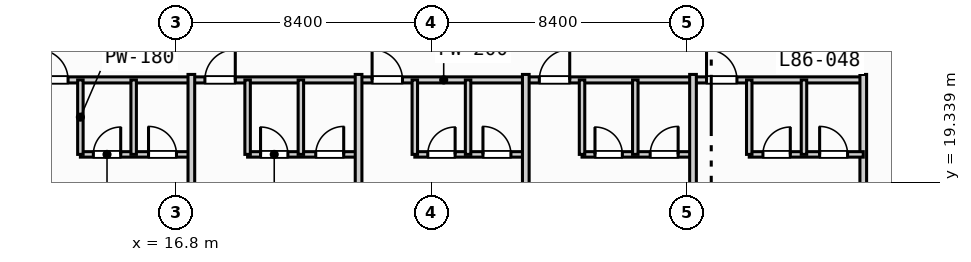
"""IFC4 building model, lengths in metres.
Left out: names, types, materials, properties, quantities, classifications, styles, units other than length and angle.
Written with IfcOpenShell. Run it as: python <this file> out.ifc"""

import sys

from ifc_helpers import new_model, si_unit, direction, frame, frame_2d, origin, place, context, subcontext, project, spatial, rectangle, extrude, element, fill, save


model = new_model("IFC4")
c1 = context("Model", 3, precision=1e-05, world=origin(), true_north=direction((0.0, 1.0)))
c2 = subcontext(c1, "Body", "Model", "MODEL_VIEW")
j1 = project(units=[si_unit("LENGTHUNIT", "METRE"), si_unit("PLANEANGLEUNIT", "RADIAN")], contexts=[c1])
p1 = place(None, origin())
s1 = spatial("IfcSite", under=j1, at=p1, CompositionType="ELEMENT")
p2 = place(p1, origin())
s2 = spatial("IfcBuilding", under=s1, at=p2, CompositionType="ELEMENT")
p3 = place(p2, frame((0.0, 0.0, 347.6)))
s3 = spatial("IfcBuildingStorey", under=s2, at=p3, CompositionType="ELEMENT", Elevation=347.6)
p4 = place(p3, frame((11.8, 22.7, 0.0), z_axis=(0.0, 0.0, 1.0), x_axis=(1.0, 0.0, 0.0)))
e1 = element("IfcWall", 1, at=p4, inside=s3, PredefinedType="PARTITIONING", context=c2, shape_type="SweptSolid", body=[
    extrude(rectangle(XDim=27.6, YDim=0.2, at=frame_2d((13.8, 0.0))), origin(), (0.0, 0.0, 1.0), 3.67),
])
p5 = place(p4, frame((0.445, 0.0, 0.0)))
e2 = element("IfcOpeningElement", 2, at=p5, cuts=e1, PredefinedType="OPENING", context=c2, shape_type="SweptSolid", body=[
    extrude(rectangle(XDim=1.0, YDim=2.15, at=frame_2d((0.5, 1.075))), frame((0.0, 0.11, 0.0), z_axis=(0.0, -1.0, 0.0), x_axis=(1.0, 0.0, 0.0)), (0.0, 0.0, 1.0), 0.22),
])
p6 = place(p4, frame((5.945, 0.0, 0.0)))
e3 = element("IfcOpeningElement", 3, at=p6, cuts=e1, PredefinedType="OPENING", context=c2, shape_type="SweptSolid", body=[
    extrude(rectangle(XDim=1.0, YDim=2.15, at=frame_2d((0.5, 1.075))), frame((0.0, 0.11, 0.0), z_axis=(0.0, -1.0, 0.0), x_axis=(1.0, 0.0, 0.0)), (0.0, 0.0, 1.0), 0.22),
])
p7 = place(p4, frame((11.445, 0.0, 0.0)))
e4 = element("IfcOpeningElement", 4, at=p7, cuts=e1, PredefinedType="OPENING", context=c2, shape_type="SweptSolid", body=[
    extrude(rectangle(XDim=1.0, YDim=2.15, at=frame_2d((0.5, 1.075))), frame((0.0, 0.11, 0.0), z_axis=(0.0, -1.0, 0.0), x_axis=(1.0, 0.0, 0.0)), (0.0, 0.0, 1.0), 0.22),
])
p8 = place(p4, frame((16.945, 0.0, 0.0)))
e5 = element("IfcOpeningElement", 5, at=p8, cuts=e1, PredefinedType="OPENING", context=c2, shape_type="SweptSolid", body=[
    extrude(rectangle(XDim=1.0, YDim=2.15, at=frame_2d((0.5, 1.075))), frame((0.0, 0.11, 0.0), z_axis=(0.0, -1.0, 0.0), x_axis=(1.0, 0.0, 0.0)), (0.0, 0.0, 1.0), 0.22),
])
p9 = place(p4, frame((22.445, 0.0, 0.0)))
e6 = element("IfcOpeningElement", 6, at=p9, cuts=e1, PredefinedType="OPENING", context=c2, shape_type="SweptSolid", body=[
    extrude(rectangle(XDim=1.0, YDim=2.15, at=frame_2d((0.5, 1.075))), frame((0.0, 0.11, 0.0), z_axis=(0.0, -1.0, 0.0), x_axis=(1.0, 0.0, 0.0)), (0.0, 0.0, 1.0), 0.22),
])
p10 = place(p3, frame((13.65, 20.25, 0.0), z_axis=(0.0, 0.0, 1.0), x_axis=(1.0, 0.0, 0.0)))
e7 = element("IfcWall", 7, at=p10, inside=s3, PredefinedType="PLUMBINGWALL", context=c2, shape_type="SweptSolid", body=[
    extrude(rectangle(XDim=3.65, YDim=0.18, at=frame_2d((1.825, 0.0))), origin(), (0.0, 0.0, 1.0), 3.67),
])
p11 = place(p10, frame((0.426, 0.0, 0.0)))
e8 = element("IfcOpeningElement", 8, at=p11, cuts=e7, PredefinedType="OPENING", context=c2, shape_type="SweptSolid", body=[
    extrude(rectangle(XDim=0.9, YDim=2.1, at=frame_2d((0.45, 1.05))), frame((0.0, 0.1, 0.0), z_axis=(0.0, -1.0, 0.0), x_axis=(1.0, 0.0, 0.0)), (0.0, 0.0, 1.0), 0.2),
])
p12 = place(p10, frame((2.241, 0.0, 0.0)))
e9 = element("IfcOpeningElement", 9, at=p12, cuts=e7, PredefinedType="OPENING", context=c2, shape_type="SweptSolid", body=[
    extrude(rectangle(XDim=0.92, YDim=2.1, at=frame_2d((0.46, 1.05))), frame((0.0, 0.1, 0.0), z_axis=(0.0, -1.0, 0.0), x_axis=(1.0, 0.0, 0.0)), (0.0, 0.0, 1.0), 0.2),
])
for number, where, z_axis, x_axis in (
    (10, (13.65, 20.25, 0.0), (0.0, 0.0, 1.0), (0.0, 1.0, 0.0)),
    (11, (15.402, 20.25, 0.0), (0.0, 0.0, 1.0), (0.0, 1.0, 0.0)),
):
    element("IfcWall", number, at=place(p3, frame(where, z_axis=z_axis, x_axis=x_axis)), inside=s3, PredefinedType="PLUMBINGWALL", context=c2, shape_type="SweptSolid", body=[
        extrude(rectangle(XDim=2.45, YDim=0.18, at=frame_2d((1.225, 0.0))), origin(), (0.0, 0.0, 1.0), 3.67),
    ])
p13 = place(p3, frame((17.3, 8.6, 0.0), z_axis=(0.0, 0.0, 1.0), x_axis=(0.0, 1.0, 0.0)))
e12 = element("IfcWall", 12, at=p13, inside=s3, PredefinedType="PARTITIONING", context=c2, shape_type="SweptSolid", body=[
    extrude(rectangle(XDim=14.28, YDim=0.22, at=frame_2d((7.14, 0.0))), origin(), (0.0, 0.0, 1.0), 3.67),
])
p14 = place(p3, frame((19.15, 20.25, 0.0), z_axis=(0.0, 0.0, 1.0), x_axis=(1.0, 0.0, 0.0)))
e13 = element("IfcWall", 13, at=p14, inside=s3, PredefinedType="PLUMBINGWALL", context=c2, shape_type="SweptSolid", body=[
    extrude(rectangle(XDim=3.65, YDim=0.18, at=frame_2d((1.825, 0.0))), origin(), (0.0, 0.0, 1.0), 3.67),
])
p15 = place(p14, frame((0.426, 0.0, 0.0)))
e14 = element("IfcOpeningElement", 14, at=p15, cuts=e13, PredefinedType="OPENING", context=c2, shape_type="SweptSolid", body=[
    extrude(rectangle(XDim=0.9, YDim=2.1, at=frame_2d((0.45, 1.05))), frame((0.0, 0.1, 0.0), z_axis=(0.0, -1.0, 0.0), x_axis=(1.0, 0.0, 0.0)), (0.0, 0.0, 1.0), 0.2),
])
p16 = place(p14, frame((2.241, 0.0, 0.0)))
e15 = element("IfcOpeningElement", 15, at=p16, cuts=e13, PredefinedType="OPENING", context=c2, shape_type="SweptSolid", body=[
    extrude(rectangle(XDim=0.92, YDim=2.1, at=frame_2d((0.46, 1.05))), frame((0.0, 0.1, 0.0), z_axis=(0.0, -1.0, 0.0), x_axis=(1.0, 0.0, 0.0)), (0.0, 0.0, 1.0), 0.2),
])
for number, where, z_axis, x_axis in (
    (16, (19.15, 20.25, 0.0), (0.0, 0.0, 1.0), (0.0, 1.0, 0.0)),
    (17, (20.902, 20.25, 0.0), (0.0, 0.0, 1.0), (0.0, 1.0, 0.0)),
):
    element("IfcWall", number, at=place(p3, frame(where, z_axis=z_axis, x_axis=x_axis)), inside=s3, PredefinedType="PLUMBINGWALL", context=c2, shape_type="SweptSolid", body=[
        extrude(rectangle(XDim=2.45, YDim=0.18, at=frame_2d((1.225, 0.0))), origin(), (0.0, 0.0, 1.0), 3.67),
    ])
p17 = place(p3, frame((22.8, 8.6, 0.0), z_axis=(0.0, 0.0, 1.0), x_axis=(0.0, 1.0, 0.0)))
e18 = element("IfcWall", 18, at=p17, inside=s3, PredefinedType="PARTITIONING", context=c2, shape_type="SweptSolid", body=[
    extrude(rectangle(XDim=14.28, YDim=0.22, at=frame_2d((7.14, 0.0))), origin(), (0.0, 0.0, 1.0), 3.67),
])
p18 = place(p3, frame((24.65, 20.25, 0.0), z_axis=(0.0, 0.0, 1.0), x_axis=(1.0, 0.0, 0.0)))
e19 = element("IfcWall", 19, at=p18, inside=s3, PredefinedType="PLUMBINGWALL", context=c2, shape_type="SweptSolid", body=[
    extrude(rectangle(XDim=3.65, YDim=0.18, at=frame_2d((1.825, 0.0))), origin(), (0.0, 0.0, 1.0), 3.67),
])
p19 = place(p18, frame((0.426, 0.0, 0.0)))
e20 = element("IfcOpeningElement", 20, at=p19, cuts=e19, PredefinedType="OPENING", context=c2, shape_type="SweptSolid", body=[
    extrude(rectangle(XDim=0.9, YDim=2.1, at=frame_2d((0.45, 1.05))), frame((0.0, 0.1, 0.0), z_axis=(0.0, -1.0, 0.0), x_axis=(1.0, 0.0, 0.0)), (0.0, 0.0, 1.0), 0.2),
])
p20 = place(p18, frame((2.241, 0.0, 0.0)))
e21 = element("IfcOpeningElement", 21, at=p20, cuts=e19, PredefinedType="OPENING", context=c2, shape_type="SweptSolid", body=[
    extrude(rectangle(XDim=0.92, YDim=2.1, at=frame_2d((0.46, 1.05))), frame((0.0, 0.1, 0.0), z_axis=(0.0, -1.0, 0.0), x_axis=(1.0, 0.0, 0.0)), (0.0, 0.0, 1.0), 0.2),
])
for number, where, z_axis, x_axis in (
    (22, (24.65, 20.25, 0.0), (0.0, 0.0, 1.0), (0.0, 1.0, 0.0)),
    (23, (26.402, 20.25, 0.0), (0.0, 0.0, 1.0), (0.0, 1.0, 0.0)),
):
    element("IfcWall", number, at=place(p3, frame(where, z_axis=z_axis, x_axis=x_axis)), inside=s3, PredefinedType="PLUMBINGWALL", context=c2, shape_type="SweptSolid", body=[
        extrude(rectangle(XDim=2.45, YDim=0.18, at=frame_2d((1.225, 0.0))), origin(), (0.0, 0.0, 1.0), 3.67),
    ])
p21 = place(p3, frame((28.3, 8.6, 0.0), z_axis=(0.0, 0.0, 1.0), x_axis=(0.0, 1.0, 0.0)))
e24 = element("IfcWall", 24, at=p21, inside=s3, PredefinedType="PARTITIONING", context=c2, shape_type="SweptSolid", body=[
    extrude(rectangle(XDim=14.28, YDim=0.22, at=frame_2d((7.14, 0.0))), origin(), (0.0, 0.0, 1.0), 3.67),
])
p22 = place(p3, frame((30.15, 20.25, 0.0), z_axis=(0.0, 0.0, 1.0), x_axis=(1.0, 0.0, 0.0)))
e25 = element("IfcWall", 25, at=p22, inside=s3, PredefinedType="PLUMBINGWALL", context=c2, shape_type="SweptSolid", body=[
    extrude(rectangle(XDim=3.65, YDim=0.18, at=frame_2d((1.825, 0.0))), origin(), (0.0, 0.0, 1.0), 3.67),
])
p23 = place(p22, frame((0.426, 0.0, 0.0)))
e26 = element("IfcOpeningElement", 26, at=p23, cuts=e25, PredefinedType="OPENING", context=c2, shape_type="SweptSolid", body=[
    extrude(rectangle(XDim=0.9, YDim=2.1, at=frame_2d((0.45, 1.05))), frame((0.0, 0.1, 0.0), z_axis=(0.0, -1.0, 0.0), x_axis=(1.0, 0.0, 0.0)), (0.0, 0.0, 1.0), 0.2),
])
p24 = place(p22, frame((2.241, 0.0, 0.0)))
e27 = element("IfcOpeningElement", 27, at=p24, cuts=e25, PredefinedType="OPENING", context=c2, shape_type="SweptSolid", body=[
    extrude(rectangle(XDim=0.92, YDim=2.1, at=frame_2d((0.46, 1.05))), frame((0.0, 0.1, 0.0), z_axis=(0.0, -1.0, 0.0), x_axis=(1.0, 0.0, 0.0)), (0.0, 0.0, 1.0), 0.2),
])
for number, where, z_axis, x_axis in (
    (28, (30.15, 20.25, 0.0), (0.0, 0.0, 1.0), (0.0, 1.0, 0.0)),
    (29, (31.902, 20.25, 0.0), (0.0, 0.0, 1.0), (0.0, 1.0, 0.0)),
):
    element("IfcWall", number, at=place(p3, frame(where, z_axis=z_axis, x_axis=x_axis)), inside=s3, PredefinedType="PLUMBINGWALL", context=c2, shape_type="SweptSolid", body=[
        extrude(rectangle(XDim=2.45, YDim=0.18, at=frame_2d((1.225, 0.0))), origin(), (0.0, 0.0, 1.0), 3.67),
    ])
p25 = place(p3, frame((33.8, 8.6, 0.0), z_axis=(0.0, 0.0, 1.0), x_axis=(0.0, 1.0, 0.0)))
e30 = element("IfcWall", 30, at=p25, inside=s3, PredefinedType="PARTITIONING", context=c2, shape_type="SweptSolid", body=[
    extrude(rectangle(XDim=14.28, YDim=0.22, at=frame_2d((7.14, 0.0))), origin(), (0.0, 0.0, 1.0), 3.059),
])
p26 = place(p3, frame((39.4, 8.6, 0.0), z_axis=(0.0, 0.0, 1.0), x_axis=(0.0, 1.0, 0.0)))
e31 = element("IfcWall", 31, at=p26, inside=s3, PredefinedType="PARTITIONING", context=c2, shape_type="SweptSolid", body=[
    extrude(rectangle(XDim=14.28, YDim=0.22, at=frame_2d((7.14, 0.0))), origin(), (0.0, 0.0, 1.0), 3.67),
])
p27 = place(p3, frame((35.65, 20.25, 0.0), z_axis=(0.0, 0.0, 1.0), x_axis=(1.0, 0.0, 0.0)))
e32 = element("IfcWall", 32, at=p27, inside=s3, PredefinedType="PLUMBINGWALL", context=c2, shape_type="SweptSolid", body=[
    extrude(rectangle(XDim=3.75, YDim=0.18, at=frame_2d((1.875, 0.0))), origin(), (0.0, 0.0, 1.0), 3.67),
])
p28 = place(p27, frame((0.45, 0.0, 0.0)))
e33 = element("IfcOpeningElement", 33, at=p28, cuts=e32, PredefinedType="OPENING", context=c2, shape_type="SweptSolid", body=[
    extrude(rectangle(XDim=0.9, YDim=2.1, at=frame_2d((0.45, 1.05))), frame((0.0, 0.1, 0.0), z_axis=(0.0, -1.0, 0.0), x_axis=(1.0, 0.0, 0.0)), (0.0, 0.0, 1.0), 0.2),
])
p29 = place(p27, frame((2.315, 0.0, 0.0)))
e34 = element("IfcOpeningElement", 34, at=p29, cuts=e32, PredefinedType="OPENING", context=c2, shape_type="SweptSolid", body=[
    extrude(rectangle(XDim=0.92, YDim=2.1, at=frame_2d((0.46, 1.05))), frame((0.0, 0.1, 0.0), z_axis=(0.0, -1.0, 0.0), x_axis=(1.0, 0.0, 0.0)), (0.0, 0.0, 1.0), 0.2),
])
for number, where, z_axis, x_axis in (
    (35, (35.65, 20.25, 0.0), (0.0, 0.0, 1.0), (0.0, 1.0, 0.0)),
    (36, (37.45, 20.25, 0.0), (0.0, 0.0, 1.0), (0.0, 1.0, 0.0)),
):
    element("IfcWall", number, at=place(p3, frame(where, z_axis=z_axis, x_axis=x_axis)), inside=s3, PredefinedType="PLUMBINGWALL", context=c2, shape_type="SweptSolid", body=[
        extrude(rectangle(XDim=2.45, YDim=0.18, at=frame_2d((1.225, 0.0))), origin(), (0.0, 0.0, 1.0), 3.67),
    ])
p30 = place(p5, origin())
e37 = element("IfcDoor", 37, at=p30, inside=s3, OperationType="SINGLE_SWING_LEFT", PredefinedType="DOOR", context=c2, shape_type="SweptSolid", body=[
    extrude(rectangle(XDim=1.0, YDim=2.15, at=frame_2d((0.5, 1.075))), frame((0.0, 0.025, 0.0), z_axis=(0.0, -1.0, 0.0), x_axis=(1.0, 0.0, 0.0)), (0.0, 0.0, 1.0), 0.05),
])
fill(e2, e37)
p31 = place(p6, origin())
e38 = element("IfcDoor", 38, at=p31, inside=s3, OperationType="SINGLE_SWING_RIGHT", PredefinedType="DOOR", context=c2, shape_type="SweptSolid", body=[
    extrude(rectangle(XDim=1.0, YDim=2.15, at=frame_2d((0.5, 1.075))), frame((0.0, 0.025, 0.0), z_axis=(0.0, -1.0, 0.0), x_axis=(1.0, 0.0, 0.0)), (0.0, 0.0, 1.0), 0.05),
])
fill(e3, e38)
p32 = place(p7, origin())
e39 = element("IfcDoor", 39, at=p32, inside=s3, OperationType="SINGLE_SWING_LEFT", PredefinedType="DOOR", context=c2, shape_type="SweptSolid", body=[
    extrude(rectangle(XDim=1.0, YDim=2.15, at=frame_2d((0.5, 1.075))), frame((0.0, 0.025, 0.0), z_axis=(0.0, -1.0, 0.0), x_axis=(1.0, 0.0, 0.0)), (0.0, 0.0, 1.0), 0.05),
])
fill(e4, e39)
p33 = place(p8, origin())
e40 = element("IfcDoor", 40, at=p33, inside=s3, OperationType="SINGLE_SWING_RIGHT", PredefinedType="DOOR", context=c2, shape_type="SweptSolid", body=[
    extrude(rectangle(XDim=1.0, YDim=2.15, at=frame_2d((0.5, 1.075))), frame((0.0, 0.025, 0.0), z_axis=(0.0, -1.0, 0.0), x_axis=(1.0, 0.0, 0.0)), (0.0, 0.0, 1.0), 0.05),
])
fill(e5, e40)
p34 = place(p9, origin())
e41 = element("IfcDoor", 41, at=p34, inside=s3, OperationType="SINGLE_SWING_LEFT", PredefinedType="DOOR", context=c2, shape_type="SweptSolid", body=[
    extrude(rectangle(XDim=1.0, YDim=2.15, at=frame_2d((0.5, 1.075))), frame((0.0, 0.025, 0.0), z_axis=(0.0, -1.0, 0.0), x_axis=(1.0, 0.0, 0.0)), (0.0, 0.0, 1.0), 0.05),
])
fill(e6, e41)
p35 = place(p11, origin())
e42 = element("IfcDoor", 42, at=p35, inside=s3, OperationType="SINGLE_SWING_RIGHT", PredefinedType="DOOR", context=c2, shape_type="SweptSolid", body=[
    extrude(rectangle(XDim=0.9, YDim=2.1, at=frame_2d((0.45, 1.05))), frame((0.0, 0.025, 0.0), z_axis=(0.0, -1.0, 0.0), x_axis=(1.0, 0.0, 0.0)), (0.0, 0.0, 1.0), 0.05),
])
fill(e8, e42)
p36 = place(p12, origin())
e43 = element("IfcDoor", 43, at=p36, inside=s3, OperationType="SINGLE_SWING_LEFT", PredefinedType="DOOR", context=c2, shape_type="SweptSolid", body=[
    extrude(rectangle(XDim=0.92, YDim=2.1, at=frame_2d((0.46, 1.05))), frame((0.0, 0.025, 0.0), z_axis=(0.0, -1.0, 0.0), x_axis=(1.0, 0.0, 0.0)), (0.0, 0.0, 1.0), 0.05),
])
fill(e9, e43)
p37 = place(p15, origin())
e44 = element("IfcDoor", 44, at=p37, inside=s3, OperationType="SINGLE_SWING_LEFT", PredefinedType="DOOR", context=c2, shape_type="SweptSolid", body=[
    extrude(rectangle(XDim=0.9, YDim=2.1, at=frame_2d((0.45, 1.05))), frame((0.0, 0.025, 0.0), z_axis=(0.0, -1.0, 0.0), x_axis=(1.0, 0.0, 0.0)), (0.0, 0.0, 1.0), 0.05),
])
fill(e14, e44)
p38 = place(p16, origin())
e45 = element("IfcDoor", 45, at=p38, inside=s3, OperationType="SINGLE_SWING_RIGHT", PredefinedType="DOOR", context=c2, shape_type="SweptSolid", body=[
    extrude(rectangle(XDim=0.92, YDim=2.1, at=frame_2d((0.46, 1.05))), frame((0.0, 0.025, 0.0), z_axis=(0.0, -1.0, 0.0), x_axis=(1.0, 0.0, 0.0)), (0.0, 0.0, 1.0), 0.05),
])
fill(e15, e45)
p39 = place(p19, origin())
e46 = element("IfcDoor", 46, at=p39, inside=s3, OperationType="SINGLE_SWING_RIGHT", PredefinedType="DOOR", context=c2, shape_type="SweptSolid", body=[
    extrude(rectangle(XDim=0.9, YDim=2.1, at=frame_2d((0.45, 1.05))), frame((0.0, 0.025, 0.0), z_axis=(0.0, -1.0, 0.0), x_axis=(1.0, 0.0, 0.0)), (0.0, 0.0, 1.0), 0.05),
])
fill(e20, e46)
p40 = place(p20, origin())
e47 = element("IfcDoor", 47, at=p40, inside=s3, OperationType="SINGLE_SWING_LEFT", PredefinedType="DOOR", context=c2, shape_type="SweptSolid", body=[
    extrude(rectangle(XDim=0.92, YDim=2.1, at=frame_2d((0.46, 1.05))), frame((0.0, 0.025, 0.0), z_axis=(0.0, -1.0, 0.0), x_axis=(1.0, 0.0, 0.0)), (0.0, 0.0, 1.0), 0.05),
])
fill(e21, e47)
p41 = place(p23, origin())
e48 = element("IfcDoor", 48, at=p41, inside=s3, OperationType="SINGLE_SWING_LEFT", PredefinedType="DOOR", context=c2, shape_type="SweptSolid", body=[
    extrude(rectangle(XDim=0.9, YDim=2.1, at=frame_2d((0.45, 1.05))), frame((0.0, 0.025, 0.0), z_axis=(0.0, -1.0, 0.0), x_axis=(1.0, 0.0, 0.0)), (0.0, 0.0, 1.0), 0.05),
])
fill(e26, e48)
p42 = place(p24, origin())
e49 = element("IfcDoor", 49, at=p42, inside=s3, OperationType="SINGLE_SWING_RIGHT", PredefinedType="DOOR", context=c2, shape_type="SweptSolid", body=[
    extrude(rectangle(XDim=0.92, YDim=2.1, at=frame_2d((0.46, 1.05))), frame((0.0, 0.025, 0.0), z_axis=(0.0, -1.0, 0.0), x_axis=(1.0, 0.0, 0.0)), (0.0, 0.0, 1.0), 0.05),
])
fill(e27, e49)
p43 = place(p28, origin())
e50 = element("IfcDoor", 50, at=p43, inside=s3, OperationType="SINGLE_SWING_RIGHT", PredefinedType="DOOR", context=c2, shape_type="SweptSolid", body=[
    extrude(rectangle(XDim=0.9, YDim=2.1, at=frame_2d((0.45, 1.05))), frame((0.0, 0.025, 0.0), z_axis=(0.0, -1.0, 0.0), x_axis=(1.0, 0.0, 0.0)), (0.0, 0.0, 1.0), 0.05),
])
fill(e33, e50)
p44 = place(p29, origin())
e51 = element("IfcDoor", 51, at=p44, inside=s3, OperationType="SINGLE_SWING_LEFT", PredefinedType="DOOR", context=c2, shape_type="SweptSolid", body=[
    extrude(rectangle(XDim=0.92, YDim=2.1, at=frame_2d((0.46, 1.05))), frame((0.0, 0.025, 0.0), z_axis=(0.0, -1.0, 0.0), x_axis=(1.0, 0.0, 0.0)), (0.0, 0.0, 1.0), 0.05),
])
fill(e34, e51)
save(model, sys.argv[1])
